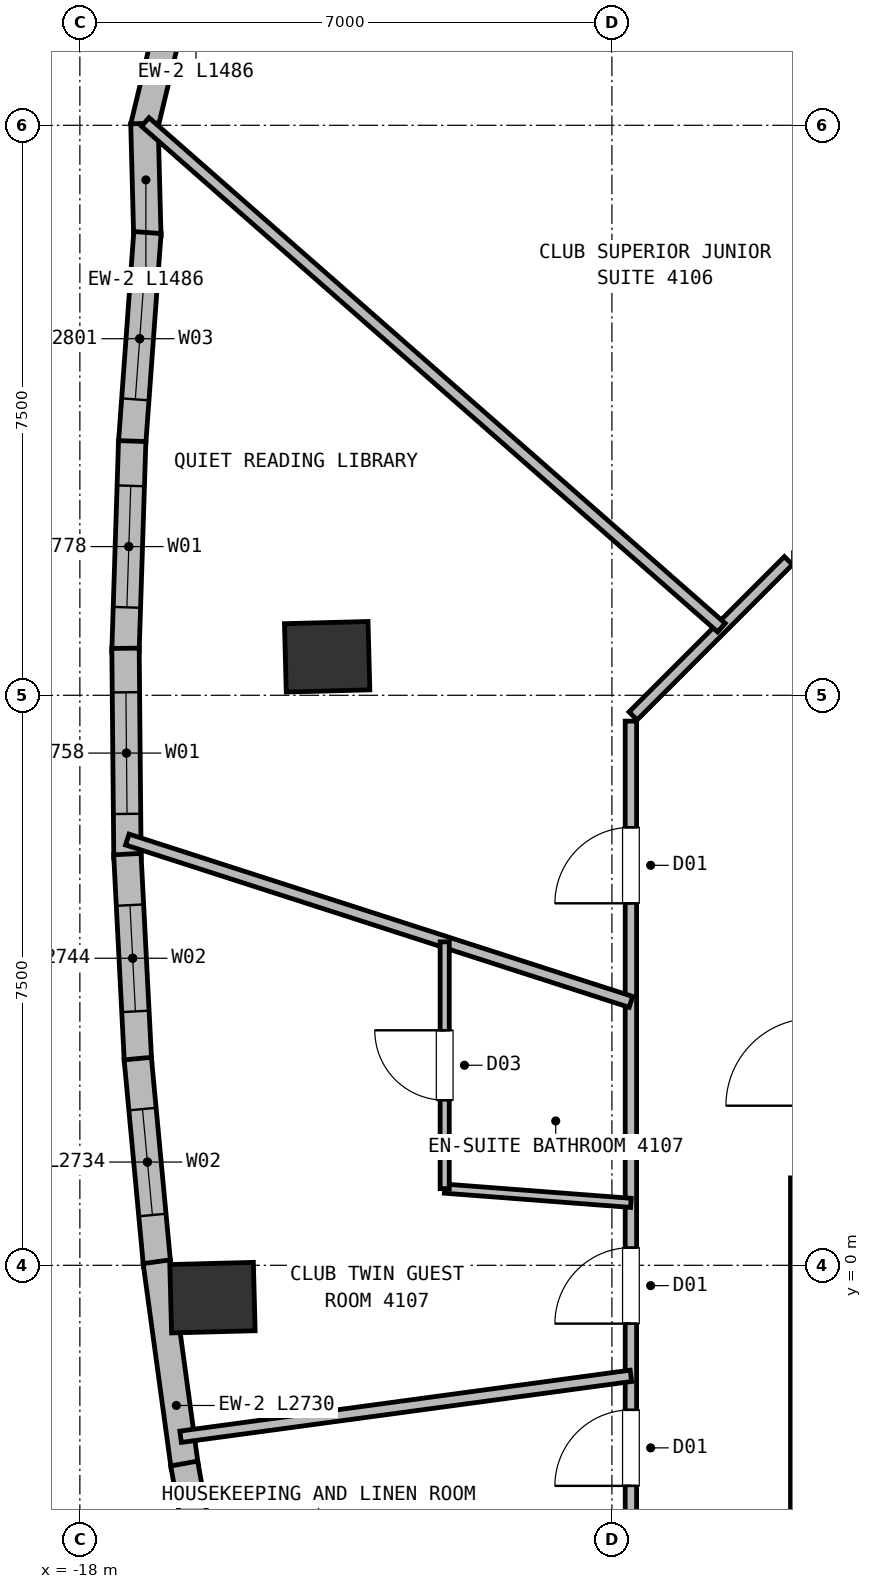
"""IFC4 building model, lengths in metres.
Left out: names, types, materials, properties, quantities, classifications, styles, units other than length and angle.
Written with IfcOpenShell. Run it as: python <this file> out.ifc"""

import sys

from ifc_helpers import new_model, si_unit, direction, frame, frame_2d, origin, origin_2d, place, context, subcontext, project, spatial, rectangle, extrude, element, fill, save


model = new_model("IFC4")
c1 = context("Model", 3, precision=1e-05, world=origin(), true_north=direction((0.0, 1.0)))
c2 = subcontext(c1, "Body", "Model", "MODEL_VIEW")
j1 = project(units=[si_unit("LENGTHUNIT", "METRE"), si_unit("PLANEANGLEUNIT", "RADIAN")], contexts=[c1])
p1 = place(None, origin())
s1 = spatial("IfcSite", under=j1, at=p1, CompositionType="ELEMENT")
p2 = place(p1, origin())
s2 = spatial("IfcBuilding", under=s1, at=p2, CompositionType="ELEMENT")
p3 = place(p2, frame((0.0, 0.0, 153.5)))
s3 = spatial("IfcBuildingStorey", under=s2, at=p3, CompositionType="ELEMENT", Elevation=153.5)
p4 = place(p3, frame((-8.35, -6.95, 0.0), z_axis=(0.0, 0.0, 1.0), x_axis=(0.0, 1.0, 0.0)))
e1 = element("IfcWall", 1, at=p4, inside=s3, PredefinedType="SHEAR", context=c2, shape_type="SweptSolid", body=[
    extrude(rectangle(XDim=8.1, YDim=0.6, at=frame_2d((4.05, 0.0))), origin(), (0.0, 0.0, 1.0), 3.5),
])
for number, where, z_axis, x_axis in (
    (2, (-14.747, 8.007, 0.0), (0.0, 0.0, 1.0), (-0.026, 1.0, 0.0)),
    (3, (-16.255, -0.426, 0.0), (0.0, 0.0, 1.0), (-0.026, 1.0, 0.0)),
):
    element("IfcColumn", number, at=place(p3, frame(where, z_axis=z_axis, x_axis=x_axis)), inside=s3, PredefinedType="COLUMN", context=c2, shape_type="SweptSolid", body=[
        extrude(rectangle(XDim=0.9, YDim=1.1, at=origin_2d()), origin(), (0.0, 0.0, 1.0), 3.75),
    ])
p5 = place(p3, frame((-17.156, 14.975, 0.0), z_axis=(0.0, 0.0, 1.0), x_axis=(0.233323235941, 0.972399232605, 0.0)))
e4 = element("IfcWall", 4, at=p5, inside=s3, PredefinedType="SOLIDWALL", context=c2, shape_type="SweptSolid", body=[
    extrude(rectangle(XDim=1.486, YDim=0.36, at=frame_2d((0.743, 0.0))), origin(), (0.0, 0.0, 1.0), 3.5),
])
p6 = place(p3, frame((-17.112, 13.539, 0.0), z_axis=(0.0, 0.0, 1.0), x_axis=(-0.026129494011, 0.999658566483, 0.0)))
e5 = element("IfcWall", 5, at=p6, inside=s3, PredefinedType="SOLIDWALL", context=c2, shape_type="SweptSolid", body=[
    extrude(rectangle(XDim=1.486, YDim=0.36, at=frame_2d((0.743, 0.0))), origin(), (0.0, 0.0, 1.0), 3.5),
])
p7 = place(p3, frame((-17.314, 10.795, 0.0), z_axis=(0.0, 0.0, 1.0), x_axis=(0.072603479606, 0.99736088491, 0.0)))
e6 = element("IfcWall", 6, at=p7, inside=s3, PredefinedType="SOLIDWALL", context=c2, shape_type="SweptSolid", body=[
    extrude(rectangle(XDim=2.801, YDim=0.36, at=frame_2d((1.4, 0.0))), origin(), (0.0, 0.0, 1.0), 3.5),
])
p8 = place(p7, frame((0.601, 0.0, 0.72)))
e7 = element("IfcOpeningElement", 7, at=p8, cuts=e6, PredefinedType="OPENING", context=c2, shape_type="SweptSolid", body=[
    extrude(rectangle(XDim=1.6, YDim=1.88, at=frame_2d((0.8, 0.94))), frame((0.0, 0.19, 0.0), z_axis=(0.0, -1.0, 0.0), x_axis=(1.0, 0.0, 0.0)), (0.0, 0.0, 1.0), 0.38),
])
p9 = place(p3, frame((-17.4, 8.069, 0.0), z_axis=(0.0, 0.0, 1.0), x_axis=(0.031907059623, 0.999490840151, 0.0)))
e8 = element("IfcWall", 8, at=p9, inside=s3, PredefinedType="SOLIDWALL", context=c2, shape_type="SweptSolid", body=[
    extrude(rectangle(XDim=2.778, YDim=0.36, at=frame_2d((1.389, 0.0))), origin(), (0.0, 0.0, 1.0), 3.5),
])
p10 = place(p9, frame((0.589, 0.0, 0.72)))
e9 = element("IfcOpeningElement", 9, at=p10, cuts=e8, PredefinedType="OPENING", context=c2, shape_type="SweptSolid", body=[
    extrude(rectangle(XDim=1.6, YDim=1.88, at=frame_2d((0.8, 0.94))), frame((0.0, 0.19, 0.0), z_axis=(0.0, -1.0, 0.0), x_axis=(1.0, 0.0, 0.0)), (0.0, 0.0, 1.0), 0.38),
])
p11 = place(p3, frame((-17.374, 5.36, 0.0), z_axis=(0.0, 0.0, 1.0), x_axis=(-0.009381778629, 0.999955990146, 0.0)))
e10 = element("IfcWall", 10, at=p11, inside=s3, PredefinedType="SOLIDWALL", context=c2, shape_type="SweptSolid", body=[
    extrude(rectangle(XDim=2.758, YDim=0.36, at=frame_2d((1.379, 0.0))), origin(), (0.0, 0.0, 1.0), 3.5),
])
p12 = place(p11, frame((0.579, 0.0, 0.72)))
e11 = element("IfcOpeningElement", 11, at=p12, cuts=e10, PredefinedType="OPENING", context=c2, shape_type="SweptSolid", body=[
    extrude(rectangle(XDim=1.6, YDim=1.88, at=frame_2d((0.8, 0.94))), frame((0.0, 0.19, 0.0), z_axis=(0.0, -1.0, 0.0), x_axis=(1.0, 0.0, 0.0)), (0.0, 0.0, 1.0), 0.38),
])
p13 = place(p3, frame((-17.235, 2.67, 0.0), z_axis=(0.0, 0.0, 1.0), x_axis=(-0.051157869298, 0.998690578913, 0.0)))
e12 = element("IfcWall", 12, at=p13, inside=s3, PredefinedType="SOLIDWALL", context=c2, shape_type="SweptSolid", body=[
    extrude(rectangle(XDim=2.744, YDim=0.36, at=frame_2d((1.372, 0.0))), origin(), (0.0, 0.0, 1.0), 3.5),
])
p14 = place(p13, frame((0.672, 0.0, 0.72)))
e13 = element("IfcOpeningElement", 13, at=p14, cuts=e12, PredefinedType="OPENING", context=c2, shape_type="SweptSolid", body=[
    extrude(rectangle(XDim=1.4, YDim=1.84, at=frame_2d((0.7, 0.92))), frame((0.0, 0.19, 0.0), z_axis=(0.0, -1.0, 0.0), x_axis=(1.0, 0.0, 0.0)), (0.0, 0.0, 1.0), 0.38),
])
p15 = place(p3, frame((-16.983, -0.003, 0.0), z_axis=(0.0, 0.0, 1.0), x_axis=(-0.09321624124, 0.995645887035, 0.0)))
e14 = element("IfcWall", 14, at=p15, inside=s3, PredefinedType="SOLIDWALL", context=c2, shape_type="SweptSolid", body=[
    extrude(rectangle(XDim=2.734, YDim=0.36, at=frame_2d((1.367, 0.0))), origin(), (0.0, 0.0, 1.0), 3.5),
])
p16 = place(p15, frame((0.667, 0.0, 0.72)))
e15 = element("IfcOpeningElement", 15, at=p16, cuts=e14, PredefinedType="OPENING", context=c2, shape_type="SweptSolid", body=[
    extrude(rectangle(XDim=1.4, YDim=1.84, at=frame_2d((0.7, 0.92))), frame((0.0, 0.19, 0.0), z_axis=(0.0, -1.0, 0.0), x_axis=(1.0, 0.0, 0.0)), (0.0, 0.0, 1.0), 0.38),
])
p17 = place(p3, frame((-16.62, -2.658, 0.0), z_axis=(0.0, 0.0, 1.0), x_axis=(-0.135408542402, 0.99078984989, 0.0)))
e16 = element("IfcWall", 16, at=p17, inside=s3, PredefinedType="SOLIDWALL", context=c2, shape_type="SweptSolid", body=[
    extrude(rectangle(XDim=2.73, YDim=0.36, at=frame_2d((1.365, 0.0))), origin(), (0.0, 0.0, 1.0), 3.5),
])
p18 = place(p3, frame((-16.143, -5.294, 0.0), z_axis=(0.0, 0.0, 1.0), x_axis=(-0.177366119488, 0.984144938339, 0.0)))
e17 = element("IfcWall", 17, at=p18, inside=s3, PredefinedType="SOLIDWALL", context=c2, shape_type="SweptSolid", body=[
    extrude(rectangle(XDim=2.729, YDim=0.36, at=frame_2d((1.365, 0.0))), origin(), (0.0, 0.0, 1.0), 3.5),
])
p19 = place(p18, frame((0.665, 0.0, 0.72)))
e18 = element("IfcOpeningElement", 18, at=p19, cuts=e17, PredefinedType="OPENING", context=c2, shape_type="SweptSolid", body=[
    extrude(rectangle(XDim=1.4, YDim=1.84, at=frame_2d((0.7, 0.92))), frame((0.0, 0.19, 0.0), z_axis=(0.0, -1.0, 0.0), x_axis=(1.0, 0.0, 0.0)), (0.0, 0.0, 1.0), 0.38),
])
p20 = place(p3, frame((-10.722, 7.228, 0.0), z_axis=(0.0, 0.0, 1.0), x_axis=(0.707106781187, 0.707106781187, 0.0)))
e19 = element("IfcWall", 19, at=p20, inside=s3, PredefinedType="PARTITIONING", context=c2, shape_type="SweptSolid", body=[
    extrude(rectangle(XDim=2.89, YDim=0.15, at=frame_2d((1.445, 0.0))), origin(), (0.0, 0.0, 1.0), 3.5),
])
p21 = place(p3, frame((-10.75, -5.76, 0.0), z_axis=(0.0, 0.0, 1.0), x_axis=(0.0, 1.0, 0.0)))
e20 = element("IfcWall", 20, at=p21, inside=s3, PredefinedType="PARTITIONING", context=c2, shape_type="SweptSolid", body=[
    extrude(rectangle(XDim=12.92, YDim=0.15, at=frame_2d((6.46, 0.0))), origin(), (0.0, 0.0, 1.0), 3.5),
])
p22 = place(p21, frame((0.824, 0.0, 0.0)))
e21 = element("IfcOpeningElement", 21, at=p22, cuts=e20, PredefinedType="OPENING", context=c2, shape_type="SweptSolid", body=[
    extrude(rectangle(XDim=0.95, YDim=2.1, at=frame_2d((0.475, 1.05))), frame((0.0, 0.085, 0.0), z_axis=(0.0, -1.0, 0.0), x_axis=(1.0, 0.0, 0.0)), (0.0, 0.0, 1.0), 0.17),
])
p23 = place(p21, frame((2.858, 0.0, 0.0)))
e22 = element("IfcOpeningElement", 22, at=p23, cuts=e20, PredefinedType="OPENING", context=c2, shape_type="SweptSolid", body=[
    extrude(rectangle(XDim=1.0, YDim=2.15, at=frame_2d((0.5, 1.075))), frame((0.0, 0.085, 0.0), z_axis=(0.0, -1.0, 0.0), x_axis=(1.0, 0.0, 0.0)), (0.0, 0.0, 1.0), 0.17),
])
p24 = place(p21, frame((4.992, 0.0, 0.0)))
e23 = element("IfcOpeningElement", 23, at=p24, cuts=e20, PredefinedType="OPENING", context=c2, shape_type="SweptSolid", body=[
    extrude(rectangle(XDim=1.0, YDim=2.15, at=frame_2d((0.5, 1.075))), frame((0.0, 0.085, 0.0), z_axis=(0.0, -1.0, 0.0), x_axis=(1.0, 0.0, 0.0)), (0.0, 0.0, 1.0), 0.17),
])
p25 = place(p21, frame((10.523, 0.0, 0.0)))
e24 = element("IfcOpeningElement", 24, at=p25, cuts=e20, PredefinedType="OPENING", context=c2, shape_type="SweptSolid", body=[
    extrude(rectangle(XDim=1.0, YDim=2.15, at=frame_2d((0.5, 1.075))), frame((0.0, 0.085, 0.0), z_axis=(0.0, -1.0, 0.0), x_axis=(1.0, 0.0, 0.0)), (0.0, 0.0, 1.0), 0.17),
])
p26 = place(p3, frame((-9.56, 8.39, 0.0), z_axis=(0.0, 0.0, 1.0), x_axis=(-0.751556130323, 0.659669146598, 0.0)))
e25 = element("IfcWall", 25, at=p26, inside=s3, PredefinedType="PARTITIONING", context=c2, shape_type="SweptSolid", body=[
    extrude(rectangle(XDim=10.086, YDim=0.15, at=frame_2d((5.043, 0.0))), origin(), (0.0, 0.0, 1.0), 3.5),
])
p27 = place(p3, frame((-10.75, 3.466, 0.0), z_axis=(0.0, 0.0, 1.0), x_axis=(-0.951758183767, 0.306849082828, 0.0)))
e26 = element("IfcWall", 26, at=p27, inside=s3, PredefinedType="PARTITIONING", context=c2, shape_type="SweptSolid", body=[
    extrude(rectangle(XDim=6.962, YDim=0.15, at=frame_2d((3.481, 0.0))), origin(), (0.0, 0.0, 1.0), 3.5),
])
p28 = place(p3, frame((-13.2, 1.009, 0.0), z_axis=(0.0, 0.0, 1.0), x_axis=(0.997091773564, -0.076210203321, 0.0)))
e27 = element("IfcWall", 27, at=p28, inside=s3, PredefinedType="PARTITIONING", context=c2, shape_type="SweptSolid", body=[
    extrude(rectangle(XDim=2.457, YDim=0.12, at=frame_2d((1.229, 0.0))), origin(), (0.0, 0.0, 1.0), 3.5),
])
p29 = place(p3, frame((-13.2, 1.009, 0.0), z_axis=(0.0, 0.0, 1.0), x_axis=(0.0, 1.0, 0.0)))
e28 = element("IfcWall", 28, at=p29, inside=s3, PredefinedType="PARTITIONING", context=c2, shape_type="SweptSolid", body=[
    extrude(rectangle(XDim=3.247, YDim=0.12, at=frame_2d((1.624, 0.0))), origin(), (0.0, 0.0, 1.0), 3.5),
])
p30 = place(p29, frame((1.164, 0.0, 0.0)))
e29 = element("IfcOpeningElement", 29, at=p30, cuts=e28, PredefinedType="OPENING", context=c2, shape_type="SweptSolid", body=[
    extrude(rectangle(XDim=0.92, YDim=2.1, at=frame_2d((0.46, 1.05))), frame((0.0, 0.07, 0.0), z_axis=(0.0, -1.0, 0.0), x_axis=(1.0, 0.0, 0.0)), (0.0, 0.0, 1.0), 0.14),
])
p31 = place(p3, frame((-10.75, -1.455, 0.0), z_axis=(0.0, 0.0, 1.0), x_axis=(-0.990972499341, -0.134065303306, 0.0)))
e30 = element("IfcWall", 30, at=p31, inside=s3, PredefinedType="PARTITIONING", context=c2, shape_type="SweptSolid", body=[
    extrude(rectangle(XDim=5.979, YDim=0.15, at=frame_2d((2.989, 0.0))), origin(), (0.0, 0.0, 1.0), 3.5),
])
p32 = place(p8, origin())
e31 = element("IfcWindow", 31, at=p32, inside=s3, PartitioningType="SINGLE_PANEL", PredefinedType="WINDOW", context=c2, shape_type="SweptSolid", body=[
    extrude(rectangle(XDim=1.6, YDim=1.88, at=frame_2d((0.8, 0.94))), frame((0.0, 0.03, 0.0), z_axis=(0.0, -1.0, 0.0), x_axis=(1.0, 0.0, 0.0)), (0.0, 0.0, 1.0), 0.06),
])
fill(e7, e31)
p33 = place(p10, origin())
e32 = element("IfcWindow", 32, at=p33, inside=s3, PartitioningType="SINGLE_PANEL", PredefinedType="WINDOW", context=c2, shape_type="SweptSolid", body=[
    extrude(rectangle(XDim=1.6, YDim=1.88, at=frame_2d((0.8, 0.94))), frame((0.0, 0.03, 0.0), z_axis=(0.0, -1.0, 0.0), x_axis=(1.0, 0.0, 0.0)), (0.0, 0.0, 1.0), 0.06),
])
fill(e9, e32)
p34 = place(p12, origin())
e33 = element("IfcWindow", 33, at=p34, inside=s3, PartitioningType="SINGLE_PANEL", PredefinedType="WINDOW", context=c2, shape_type="SweptSolid", body=[
    extrude(rectangle(XDim=1.6, YDim=1.88, at=frame_2d((0.8, 0.94))), frame((0.0, 0.03, 0.0), z_axis=(0.0, -1.0, 0.0), x_axis=(1.0, 0.0, 0.0)), (0.0, 0.0, 1.0), 0.06),
])
fill(e11, e33)
p35 = place(p14, origin())
e34 = element("IfcWindow", 34, at=p35, inside=s3, PartitioningType="SINGLE_PANEL", PredefinedType="WINDOW", context=c2, shape_type="SweptSolid", body=[
    extrude(rectangle(XDim=1.4, YDim=1.84, at=frame_2d((0.7, 0.92))), frame((0.0, 0.03, 0.0), z_axis=(0.0, -1.0, 0.0), x_axis=(1.0, 0.0, 0.0)), (0.0, 0.0, 1.0), 0.06),
])
fill(e13, e34)
p36 = place(p16, origin())
e35 = element("IfcWindow", 35, at=p36, inside=s3, PartitioningType="SINGLE_PANEL", PredefinedType="WINDOW", context=c2, shape_type="SweptSolid", body=[
    extrude(rectangle(XDim=1.4, YDim=1.84, at=frame_2d((0.7, 0.92))), frame((0.0, 0.03, 0.0), z_axis=(0.0, -1.0, 0.0), x_axis=(1.0, 0.0, 0.0)), (0.0, 0.0, 1.0), 0.06),
])
fill(e15, e35)
p37 = place(p30, origin())
e36 = element("IfcDoor", 36, at=p37, inside=s3, OperationType="SINGLE_SWING_RIGHT", PredefinedType="DOOR", context=c2, shape_type="SweptSolid", body=[
    extrude(rectangle(XDim=0.92, YDim=2.1, at=frame_2d((0.46, 1.05))), frame((0.0, 0.025, 0.0), z_axis=(0.0, -1.0, 0.0), x_axis=(1.0, 0.0, 0.0)), (0.0, 0.0, 1.0), 0.05),
])
fill(e29, e36)
p38 = place(p23, origin())
e37 = element("IfcDoor", 37, at=p38, inside=s3, OperationType="SINGLE_SWING_LEFT", PredefinedType="DOOR", context=c2, shape_type="SweptSolid", body=[
    extrude(rectangle(XDim=1.0, YDim=2.15, at=frame_2d((0.5, 1.075))), frame((0.0, 0.025, 0.0), z_axis=(0.0, -1.0, 0.0), x_axis=(1.0, 0.0, 0.0)), (0.0, 0.0, 1.0), 0.05),
])
fill(e22, e37)
p39 = place(p24, origin())
e38 = element("IfcDoor", 38, at=p39, inside=s3, OperationType="SINGLE_SWING_LEFT", PredefinedType="DOOR", context=c2, shape_type="SweptSolid", body=[
    extrude(rectangle(XDim=1.0, YDim=2.15, at=frame_2d((0.5, 1.075))), frame((0.0, 0.025, 0.0), z_axis=(0.0, -1.0, 0.0), x_axis=(1.0, 0.0, 0.0)), (0.0, 0.0, 1.0), 0.05),
])
fill(e23, e38)
p40 = place(p25, origin())
e39 = element("IfcDoor", 39, at=p40, inside=s3, OperationType="SINGLE_SWING_LEFT", PredefinedType="DOOR", context=c2, shape_type="SweptSolid", body=[
    extrude(rectangle(XDim=1.0, YDim=2.15, at=frame_2d((0.5, 1.075))), frame((0.0, 0.025, 0.0), z_axis=(0.0, -1.0, 0.0), x_axis=(1.0, 0.0, 0.0)), (0.0, 0.0, 1.0), 0.05),
])
fill(e24, e39)
save(model, sys.argv[1])
